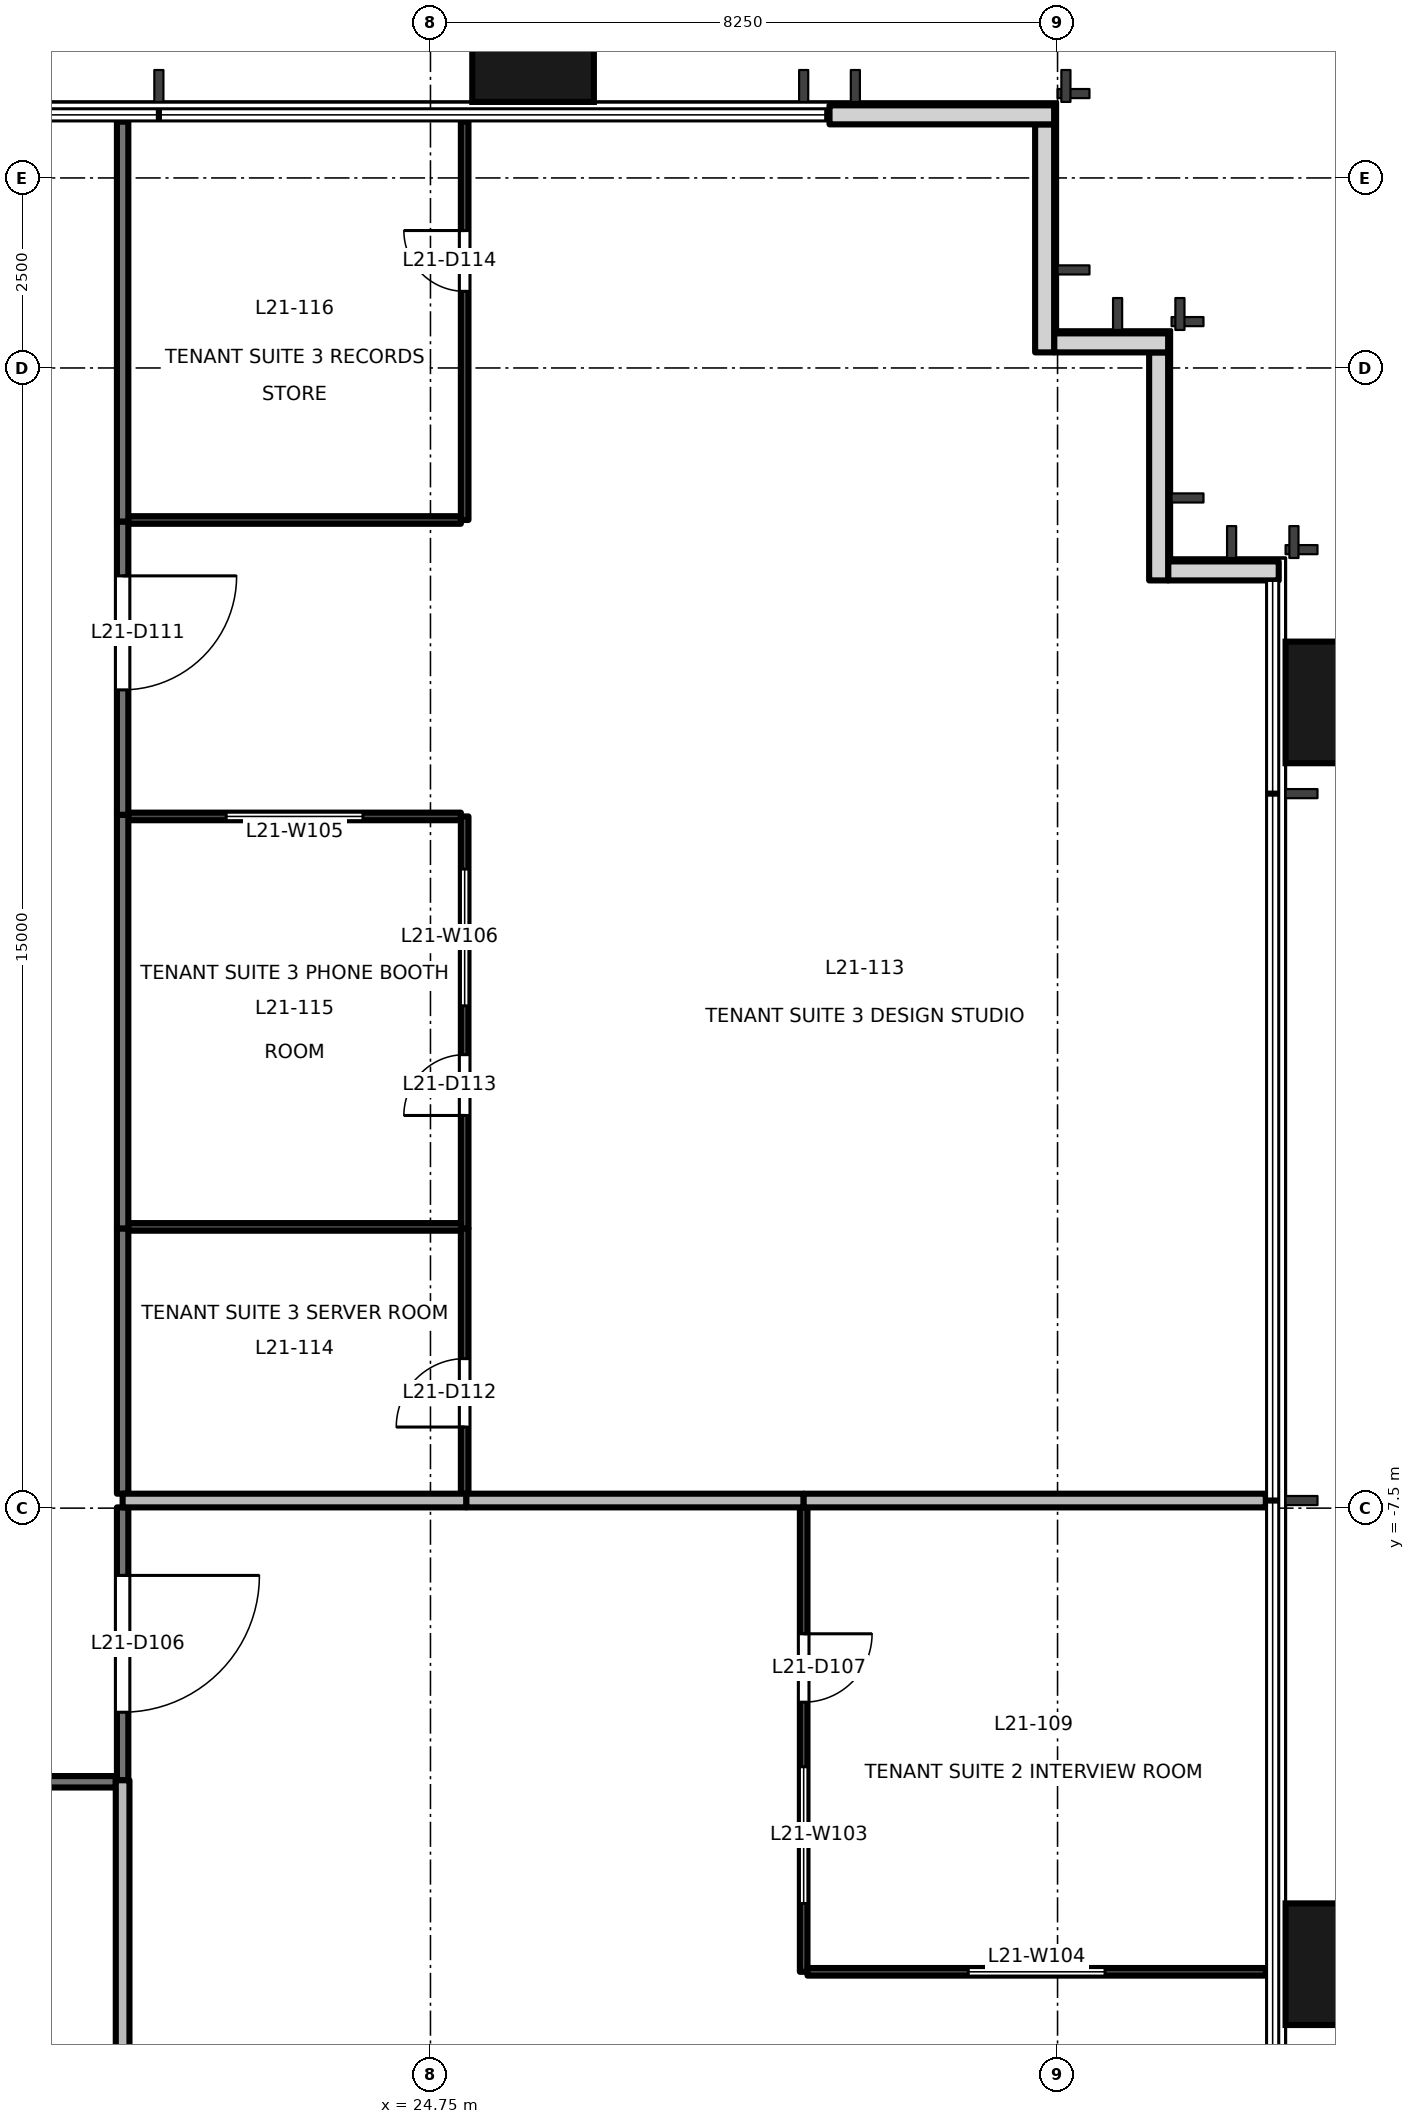
"""IFC4 building model, lengths in metres.
Left out: names, types, materials, properties, quantities, classifications, styles, units other than length and angle.
Written with IfcOpenShell. Run it as: python <this file> out.ifc"""

import sys

from ifc_helpers import new_model, si_unit, direction, frame, frame_2d, origin, origin_2d, place, context, subcontext, project, spatial, rectangle, extrude, element, fill, save


model = new_model("IFC4")
c1 = context("Model", 3, precision=1e-05, world=origin(), true_north=direction((0.0, 1.0)))
c2 = subcontext(c1, "Body", "Model", "MODEL_VIEW")
j1 = project(units=[si_unit("LENGTHUNIT", "METRE"), si_unit("PLANEANGLEUNIT", "RADIAN")], contexts=[c1])
p1 = place(None, origin())
s1 = spatial("IfcSite", under=j1, at=p1, CompositionType="ELEMENT")
p2 = place(p1, origin())
s2 = spatial("IfcBuilding", under=s1, at=p2, CompositionType="ELEMENT")
p3 = place(p2, frame((0.0, 0.0, 95.7)))
s3 = spatial("IfcBuildingStorey", under=s2, at=p3, CompositionType="ELEMENT", Elevation=95.7)
for number, where, z_axis, x_axis in (
    (1, (36.9, -13.5, -0.2), (0.0, 0.0, 1.0), (0.0, 1.0, 0.0)),
    (2, (36.9, 3.1, -0.2), (0.0, 0.0, 1.0), (0.0, 1.0, 0.0)),
    (3, (26.1, 11.9, -0.2), (0.0, 0.0, 1.0), (1.0, 0.0, 0.0)),
):
    element("IfcColumn", number, at=place(p3, frame(where, z_axis=z_axis, x_axis=x_axis)), inside=s3, PredefinedType="COLUMN", context=c2, shape_type="SweptSolid", body=[
        extrude(rectangle(XDim=1.6, YDim=1.8, at=origin_2d()), origin(), (0.0, 0.0, 1.0), 4.0),
    ])
p4 = place(p3, frame((35.91, 4.83, 0.0), z_axis=(0.0, 0.0, 1.0), x_axis=(-1.0, 0.0, 0.0)))
e4 = element("IfcWall", 4, at=p4, inside=s3, PredefinedType="SOLIDWALL", context=c2, shape_type="SweptSolid", body=[
    extrude(rectangle(XDim=1.455, YDim=0.25, at=frame_2d((0.728, 0.0))), origin(), (0.0, 0.0, 1.0), 3.8),
])
p5 = place(p3, frame((34.33, 4.705, 0.0), z_axis=(0.0, 0.0, 1.0), x_axis=(0.0, 1.0, 0.0)))
e5 = element("IfcWall", 5, at=p5, inside=s3, PredefinedType="SOLIDWALL", context=c2, shape_type="SweptSolid", body=[
    extrude(rectangle(XDim=3.0, YDim=0.25, at=frame_2d((1.5, 0.0))), origin(), (0.0, 0.0, 1.0), 3.8),
])
p6 = place(p3, frame((34.455, 7.83, 0.0), z_axis=(0.0, 0.0, 1.0), x_axis=(-1.0, 0.0, 0.0)))
e6 = element("IfcWall", 6, at=p6, inside=s3, PredefinedType="SOLIDWALL", context=c2, shape_type="SweptSolid", body=[
    extrude(rectangle(XDim=1.5, YDim=0.25, at=frame_2d((0.75, 0.0))), origin(), (0.0, 0.0, 1.0), 3.8),
])
p7 = place(p3, frame((32.83, 7.705, 0.0), z_axis=(0.0, 0.0, 1.0), x_axis=(0.0, 1.0, 0.0)))
e7 = element("IfcWall", 7, at=p7, inside=s3, PredefinedType="SOLIDWALL", context=c2, shape_type="SweptSolid", body=[
    extrude(rectangle(XDim=3.0, YDim=0.25, at=frame_2d((1.5, 0.0))), origin(), (0.0, 0.0, 1.0), 3.8),
])
p8 = place(p3, frame((32.955, 10.83, 0.0), z_axis=(0.0, 0.0, 1.0), x_axis=(-1.0, 0.0, 0.0)))
e8 = element("IfcWall", 8, at=p8, inside=s3, PredefinedType="SOLIDWALL", context=c2, shape_type="SweptSolid", body=[
    extrude(rectangle(XDim=2.955, YDim=0.25, at=frame_2d((1.478, 0.0))), origin(), (0.0, 0.0, 1.0), 3.8),
])
p9 = place(p3, frame((20.7, -7.49, 0.0), z_axis=(0.0, 0.0, 1.0), x_axis=(0.0, -1.0, 0.0)))
e9 = element("IfcWall", 9, at=p9, inside=s3, PredefinedType="PARTITIONING", context=c2, shape_type="SweptSolid", body=[
    extrude(rectangle(XDim=3.59, YDim=0.15, at=frame_2d((1.795, 0.0))), origin(), (0.0, 0.0, 1.0), 2.9),
])
p10 = place(p9, frame((0.895, 0.0, 0.0)))
e10 = element("IfcOpeningElement", 10, at=p10, cuts=e9, PredefinedType="OPENING", context=c2, shape_type="SweptSolid", body=[
    extrude(rectangle(XDim=1.8, YDim=2.1, at=frame_2d((0.9, 1.05))), frame((0.0, 0.085, 0.0), z_axis=(0.0, -1.0, 0.0), x_axis=(1.0, 0.0, 0.0)), (0.0, 0.0, 1.0), 0.171),
])
p11 = place(p3, frame((20.7, 5.48, 0.0), z_axis=(0.0, 0.0, 1.0), x_axis=(0.0, -1.0, 0.0)))
e11 = element("IfcWall", 11, at=p11, inside=s3, PredefinedType="PARTITIONING", context=c2, shape_type="SweptSolid", body=[
    extrude(rectangle(XDim=3.86, YDim=0.15, at=frame_2d((1.93, 0.0))), origin(), (0.0, 0.0, 1.0), 2.9),
])
p12 = place(p11, frame((0.715, 0.0, 0.0)))
e12 = element("IfcOpeningElement", 12, at=p12, cuts=e11, PredefinedType="OPENING", context=c2, shape_type="SweptSolid", body=[
    extrude(rectangle(XDim=1.5, YDim=2.1, at=frame_2d((0.75, 1.05))), frame((0.0, 0.085, 0.0), z_axis=(0.0, -1.0, 0.0), x_axis=(1.0, 0.0, 0.0)), (0.0, 0.0, 1.0), 0.171),
])
p13 = place(p3, frame((20.7, -3.82, 0.0), z_axis=(0.0, 0.0, 1.0), x_axis=(0.0, -1.0, 0.0)))
e13 = element("IfcWall", 13, at=p13, inside=s3, PredefinedType="PARTITIONING", context=c2, shape_type="SweptSolid", body=[
    extrude(rectangle(XDim=3.49, YDim=0.15, at=frame_2d((1.745, 0.0))), origin(), (0.0, 0.0, 1.0), 2.9),
])
p14 = place(p3, frame((20.7, 1.62, 0.0), z_axis=(0.0, 0.0, 1.0), x_axis=(0.0, -1.0, 0.0)))
e14 = element("IfcWall", 14, at=p14, inside=s3, PredefinedType="PARTITIONING", context=c2, shape_type="SweptSolid", body=[
    extrude(rectangle(XDim=5.44, YDim=0.15, at=frame_2d((2.72, 0.0))), origin(), (0.0, 0.0, 1.0), 2.9),
])
p15 = place(p3, frame((20.7, 10.74, 0.0), z_axis=(0.0, 0.0, 1.0), x_axis=(0.0, -1.0, 0.0)))
e15 = element("IfcWall", 15, at=p15, inside=s3, PredefinedType="PARTITIONING", context=c2, shape_type="SweptSolid", body=[
    extrude(rectangle(XDim=5.26, YDim=0.15, at=frame_2d((2.63, 0.0))), origin(), (0.0, 0.0, 1.0), 3.8),
])
p16 = place(p3, frame((20.61, -11.1, 0.0), z_axis=(0.0, 0.0, 1.0), x_axis=(-1.0, 0.0, 0.0)))
e16 = element("IfcWall", 16, at=p16, inside=s3, PredefinedType="PARTITIONING", context=c2, shape_type="SweptSolid", body=[
    extrude(rectangle(XDim=8.63, YDim=0.15, at=frame_2d((4.315, 0.0))), origin(), (0.0, 0.0, 1.0), 2.4),
])
p17 = place(p3, frame((29.66, -7.49, 0.0), z_axis=(0.0, 0.0, 1.0), x_axis=(0.0, -1.0, 0.0)))
e17 = element("IfcWall", 17, at=p17, inside=s3, PredefinedType="PARTITIONING", context=c2, shape_type="SweptSolid", body=[
    extrude(rectangle(XDim=6.11, YDim=0.1, at=frame_2d((3.055, 0.0))), origin(), (0.0, 0.0, 1.0), 2.9),
])
p18 = place(p17, frame((1.663, 0.0, 0.0)))
e18 = element("IfcOpeningElement", 18, at=p18, cuts=e17, PredefinedType="OPENING", context=c2, shape_type="SweptSolid", body=[
    extrude(rectangle(XDim=0.9, YDim=2.1, at=frame_2d((0.45, 1.05))), frame((0.0, 0.061, 0.0), z_axis=(0.0, -1.0, 0.0), x_axis=(1.0, 0.0, 0.0)), (0.0, 0.0, 1.0), 0.121),
])
p19 = place(p17, frame((3.412, 0.0, 0.9)))
e19 = element("IfcOpeningElement", 19, at=p19, cuts=e17, PredefinedType="OPENING", context=c2, shape_type="SweptSolid", body=[
    extrude(rectangle(XDim=1.8, YDim=1.2, at=frame_2d((0.9, 0.6))), frame((0.0, 0.061, 0.0), z_axis=(0.0, -1.0, 0.0), x_axis=(1.0, 0.0, 0.0)), (0.0, 0.0, 1.0), 0.121),
])
p20 = place(p3, frame((29.71, -13.6, 0.0), z_axis=(0.0, 0.0, 1.0), x_axis=(1.0, 0.0, 0.0)))
e20 = element("IfcWall", 20, at=p20, inside=s3, PredefinedType="PARTITIONING", context=c2, shape_type="SweptSolid", body=[
    extrude(rectangle(XDim=6.03, YDim=0.1, at=frame_2d((3.015, 0.0))), origin(), (0.0, 0.0, 1.0), 2.9),
])
p21 = place(p20, frame((2.115, 0.0, 0.9)))
e21 = element("IfcOpeningElement", 21, at=p21, cuts=e20, PredefinedType="OPENING", context=c2, shape_type="SweptSolid", body=[
    extrude(rectangle(XDim=1.8, YDim=1.2, at=frame_2d((0.9, 0.6))), frame((0.0, 0.061, 0.0), z_axis=(0.0, -1.0, 0.0), x_axis=(1.0, 0.0, 0.0)), (0.0, 0.0, 1.0), 0.121),
])
p22 = place(p3, frame((25.22, -7.4, 0.0), z_axis=(0.0, 0.0, 1.0), x_axis=(1.0, 0.0, 0.0)))
e22 = element("IfcWall", 22, at=p22, inside=s3, PredefinedType="PARTITIONING", context=c2, shape_type="SweptSolid", body=[
    extrude(rectangle(XDim=4.44, YDim=0.18, at=frame_2d((2.22, 0.0))), origin(), (0.0, 0.0, 1.0), 3.8),
])
p23 = place(p3, frame((20.7, -7.4, 0.0), z_axis=(0.0, 0.0, 1.0), x_axis=(1.0, 0.0, 0.0)))
e23 = element("IfcWall", 23, at=p23, inside=s3, PredefinedType="PARTITIONING", context=c2, shape_type="SweptSolid", body=[
    extrude(rectangle(XDim=4.52, YDim=0.18, at=frame_2d((2.26, 0.0))), origin(), (0.0, 0.0, 1.0), 3.8),
])
p24 = place(p3, frame((20.7, -15.92, 0.0), z_axis=(0.0, 0.0, 1.0), x_axis=(0.0, 1.0, 0.0)))
e24 = element("IfcWall", 24, at=p24, inside=s3, PredefinedType="PARTITIONING", context=c2, shape_type="SweptSolid", body=[
    extrude(rectangle(XDim=4.84, YDim=0.18, at=frame_2d((2.42, 0.0))), origin(), (0.0, 0.0, 1.0), 2.9),
])
p25 = place(p3, frame((29.66, -7.4, 0.0), z_axis=(0.0, 0.0, 1.0), x_axis=(1.0, 0.0, 0.0)))
e25 = element("IfcWall", 25, at=p25, inside=s3, PredefinedType="PARTITIONING", context=c2, shape_type="SweptSolid", body=[
    extrude(rectangle(XDim=6.08, YDim=0.18, at=frame_2d((3.04, 0.0))), origin(), (0.0, 0.0, 1.0), 3.8),
])
p26 = place(p3, frame((25.2, -7.31, 0.0), z_axis=(0.0, 0.0, 1.0), x_axis=(0.0, 1.0, 0.0)))
e26 = element("IfcWall", 26, at=p26, inside=s3, PredefinedType="PARTITIONING", context=c2, shape_type="SweptSolid", body=[
    extrude(rectangle(XDim=3.49, YDim=0.1, at=frame_2d((1.745, 0.0))), origin(), (0.0, 0.0, 1.0), 2.9),
])
p27 = place(p26, frame((0.877, 0.0, 0.0)))
e27 = element("IfcOpeningElement", 27, at=p27, cuts=e26, PredefinedType="OPENING", context=c2, shape_type="SweptSolid", body=[
    extrude(rectangle(XDim=0.9, YDim=2.1, at=frame_2d((0.45, 1.05))), frame((0.0, 0.061, 0.0), z_axis=(0.0, -1.0, 0.0), x_axis=(1.0, 0.0, 0.0)), (0.0, 0.0, 1.0), 0.121),
])
p28 = place(p3, frame((25.15, 1.6, 0.0), z_axis=(0.0, 0.0, 1.0), x_axis=(-1.0, 0.0, 0.0)))
e28 = element("IfcWall", 28, at=p28, inside=s3, PredefinedType="PARTITIONING", context=c2, shape_type="SweptSolid", body=[
    extrude(rectangle(XDim=4.375, YDim=0.1, at=frame_2d((2.188, 0.0))), origin(), (0.0, 0.0, 1.0), 3.8),
])
p29 = place(p28, frame((1.288, 0.0, 0.9)))
e29 = element("IfcOpeningElement", 29, at=p29, cuts=e28, PredefinedType="OPENING", context=c2, shape_type="SweptSolid", body=[
    extrude(rectangle(XDim=1.8, YDim=1.2, at=frame_2d((0.9, 0.6))), frame((0.0, 0.061, 0.0), z_axis=(0.0, -1.0, 0.0), x_axis=(1.0, 0.0, 0.0)), (0.0, 0.0, 1.0), 0.121),
])
p30 = place(p3, frame((25.2, -3.82, 0.0), z_axis=(0.0, 0.0, 1.0), x_axis=(0.0, 1.0, 0.0)))
e30 = element("IfcWall", 30, at=p30, inside=s3, PredefinedType="PARTITIONING", context=c2, shape_type="SweptSolid", body=[
    extrude(rectangle(XDim=5.42, YDim=0.1, at=frame_2d((2.71, 0.0))), origin(), (0.0, 0.0, 1.0), 2.9),
])
p31 = place(p30, frame((1.486, 0.0, 0.0)))
e31 = element("IfcOpeningElement", 31, at=p31, cuts=e30, PredefinedType="OPENING", context=c2, shape_type="SweptSolid", body=[
    extrude(rectangle(XDim=0.8, YDim=2.1, at=frame_2d((0.4, 1.05))), frame((0.0, 0.061, 0.0), z_axis=(0.0, -1.0, 0.0), x_axis=(1.0, 0.0, 0.0)), (0.0, 0.0, 1.0), 0.121),
])
p32 = place(p30, frame((2.928, 0.0, 0.9)))
e32 = element("IfcOpeningElement", 32, at=p32, cuts=e30, PredefinedType="OPENING", context=c2, shape_type="SweptSolid", body=[
    extrude(rectangle(XDim=1.8, YDim=1.2, at=frame_2d((0.9, 0.6))), frame((0.0, 0.061, 0.0), z_axis=(0.0, -1.0, 0.0), x_axis=(1.0, 0.0, 0.0)), (0.0, 0.0, 1.0), 0.121),
])
p33 = place(p3, frame((20.775, 5.5, 0.0), z_axis=(0.0, 0.0, 1.0), x_axis=(1.0, 0.0, 0.0)))
e33 = element("IfcWall", 33, at=p33, inside=s3, PredefinedType="PARTITIONING", context=c2, shape_type="SweptSolid", body=[
    extrude(rectangle(XDim=4.375, YDim=0.1, at=frame_2d((2.188, 0.0))), origin(), (0.0, 0.0, 1.0), 3.8),
])
p34 = place(p3, frame((25.2, 5.5, 0.0), z_axis=(0.0, 0.0, 1.0), x_axis=(0.0, 1.0, 0.0)))
e34 = element("IfcWall", 34, at=p34, inside=s3, PredefinedType="PARTITIONING", context=c2, shape_type="SweptSolid", body=[
    extrude(rectangle(XDim=5.24, YDim=0.1, at=frame_2d((2.62, 0.0))), origin(), (0.0, 0.0, 1.0), 3.8),
])
p35 = place(p34, frame((3.008, 0.0, 0.0)))
e35 = element("IfcOpeningElement", 35, at=p35, cuts=e34, PredefinedType="OPENING", context=c2, shape_type="SweptSolid", body=[
    extrude(rectangle(XDim=0.8, YDim=2.1, at=frame_2d((0.4, 1.05))), frame((0.0, 0.061, 0.0), z_axis=(0.0, -1.0, 0.0), x_axis=(1.0, 0.0, 0.0)), (0.0, 0.0, 1.0), 0.121),
])
p36 = place(p3, frame((20.775, -3.8, 0.0), z_axis=(0.0, 0.0, 1.0), x_axis=(1.0, 0.0, 0.0)))
e36 = element("IfcWall", 36, at=p36, inside=s3, PredefinedType="PARTITIONING", context=c2, shape_type="SweptSolid", body=[
    extrude(rectangle(XDim=4.375, YDim=0.1, at=frame_2d((2.188, 0.0))), origin(), (0.0, 0.0, 1.0), 3.8),
])
p37 = place(p10, origin())
e37 = element("IfcDoor", 37, at=p37, inside=s3, OperationType="DOUBLE_DOOR_SINGLE_SWING", PredefinedType="DOOR", context=c2, shape_type="SweptSolid", body=[
    extrude(rectangle(XDim=1.8, YDim=2.1, at=frame_2d((0.9, 1.05))), frame((0.0, 0.025, 0.0), z_axis=(0.0, -1.0, 0.0), x_axis=(1.0, 0.0, 0.0)), (0.0, 0.0, 1.0), 0.05),
])
fill(e10, e37)
p38 = place(p18, origin())
e38 = element("IfcDoor", 38, at=p38, inside=s3, OperationType="SINGLE_SWING_LEFT", PredefinedType="DOOR", context=c2, shape_type="SweptSolid", body=[
    extrude(rectangle(XDim=0.9, YDim=2.1, at=frame_2d((0.45, 1.05))), frame((0.0, 0.025, 0.0), z_axis=(0.0, -1.0, 0.0), x_axis=(1.0, 0.0, 0.0)), (0.0, 0.0, 1.0), 0.05),
])
fill(e18, e38)
p39 = place(p12, origin())
e39 = element("IfcDoor", 39, at=p39, inside=s3, OperationType="DOUBLE_DOOR_SINGLE_SWING", PredefinedType="DOOR", context=c2, shape_type="SweptSolid", body=[
    extrude(rectangle(XDim=1.5, YDim=2.1, at=frame_2d((0.75, 1.05))), frame((0.0, 0.025, 0.0), z_axis=(0.0, -1.0, 0.0), x_axis=(1.0, 0.0, 0.0)), (0.0, 0.0, 1.0), 0.05),
])
fill(e12, e39)
p40 = place(p27, origin())
e40 = element("IfcDoor", 40, at=p40, inside=s3, OperationType="SINGLE_SWING_LEFT", PredefinedType="DOOR", context=c2, shape_type="SweptSolid", body=[
    extrude(rectangle(XDim=0.9, YDim=2.1, at=frame_2d((0.45, 1.05))), frame((0.0, 0.025, 0.0), z_axis=(0.0, -1.0, 0.0), x_axis=(1.0, 0.0, 0.0)), (0.0, 0.0, 1.0), 0.05),
])
fill(e27, e40)
p41 = place(p31, origin())
e41 = element("IfcDoor", 41, at=p41, inside=s3, OperationType="SINGLE_SWING_LEFT", PredefinedType="DOOR", context=c2, shape_type="SweptSolid", body=[
    extrude(rectangle(XDim=0.8, YDim=2.1, at=frame_2d((0.4, 1.05))), frame((0.0, 0.025, 0.0), z_axis=(0.0, -1.0, 0.0), x_axis=(1.0, 0.0, 0.0)), (0.0, 0.0, 1.0), 0.05),
])
fill(e31, e41)
p42 = place(p35, origin())
e42 = element("IfcDoor", 42, at=p42, inside=s3, OperationType="SINGLE_SWING_RIGHT", PredefinedType="DOOR", context=c2, shape_type="SweptSolid", body=[
    extrude(rectangle(XDim=0.8, YDim=2.1, at=frame_2d((0.4, 1.05))), frame((0.0, 0.025, 0.0), z_axis=(0.0, -1.0, 0.0), x_axis=(1.0, 0.0, 0.0)), (0.0, 0.0, 1.0), 0.05),
])
fill(e35, e42)
p43 = place(p19, origin())
e43 = element("IfcWindow", 43, at=p43, inside=s3, PartitioningType="SINGLE_PANEL", PredefinedType="WINDOW", context=c2, shape_type="SweptSolid", body=[
    extrude(rectangle(XDim=1.8, YDim=1.2, at=frame_2d((0.9, 0.6))), frame((0.0, 0.03, 0.0), z_axis=(0.0, -1.0, 0.0), x_axis=(1.0, 0.0, 0.0)), (0.0, 0.0, 1.0), 0.06),
])
fill(e19, e43)
p44 = place(p21, origin())
e44 = element("IfcWindow", 44, at=p44, inside=s3, PartitioningType="SINGLE_PANEL", PredefinedType="WINDOW", context=c2, shape_type="SweptSolid", body=[
    extrude(rectangle(XDim=1.8, YDim=1.2, at=frame_2d((0.9, 0.6))), frame((0.0, 0.03, 0.0), z_axis=(0.0, -1.0, 0.0), x_axis=(1.0, 0.0, 0.0)), (0.0, 0.0, 1.0), 0.06),
])
fill(e21, e44)
p45 = place(p29, origin())
e45 = element("IfcWindow", 45, at=p45, inside=s3, PartitioningType="SINGLE_PANEL", PredefinedType="WINDOW", context=c2, shape_type="SweptSolid", body=[
    extrude(rectangle(XDim=1.8, YDim=1.2, at=frame_2d((0.9, 0.6))), frame((0.0, 0.03, 0.0), z_axis=(0.0, -1.0, 0.0), x_axis=(1.0, 0.0, 0.0)), (0.0, 0.0, 1.0), 0.06),
])
fill(e29, e45)
p46 = place(p32, origin())
e46 = element("IfcWindow", 46, at=p46, inside=s3, PartitioningType="SINGLE_PANEL", PredefinedType="WINDOW", context=c2, shape_type="SweptSolid", body=[
    extrude(rectangle(XDim=1.8, YDim=1.2, at=frame_2d((0.9, 0.6))), frame((0.0, 0.03, 0.0), z_axis=(0.0, -1.0, 0.0), x_axis=(1.0, 0.0, 0.0)), (0.0, 0.0, 1.0), 0.06),
])
fill(e32, e46)
save(model, sys.argv[1])
